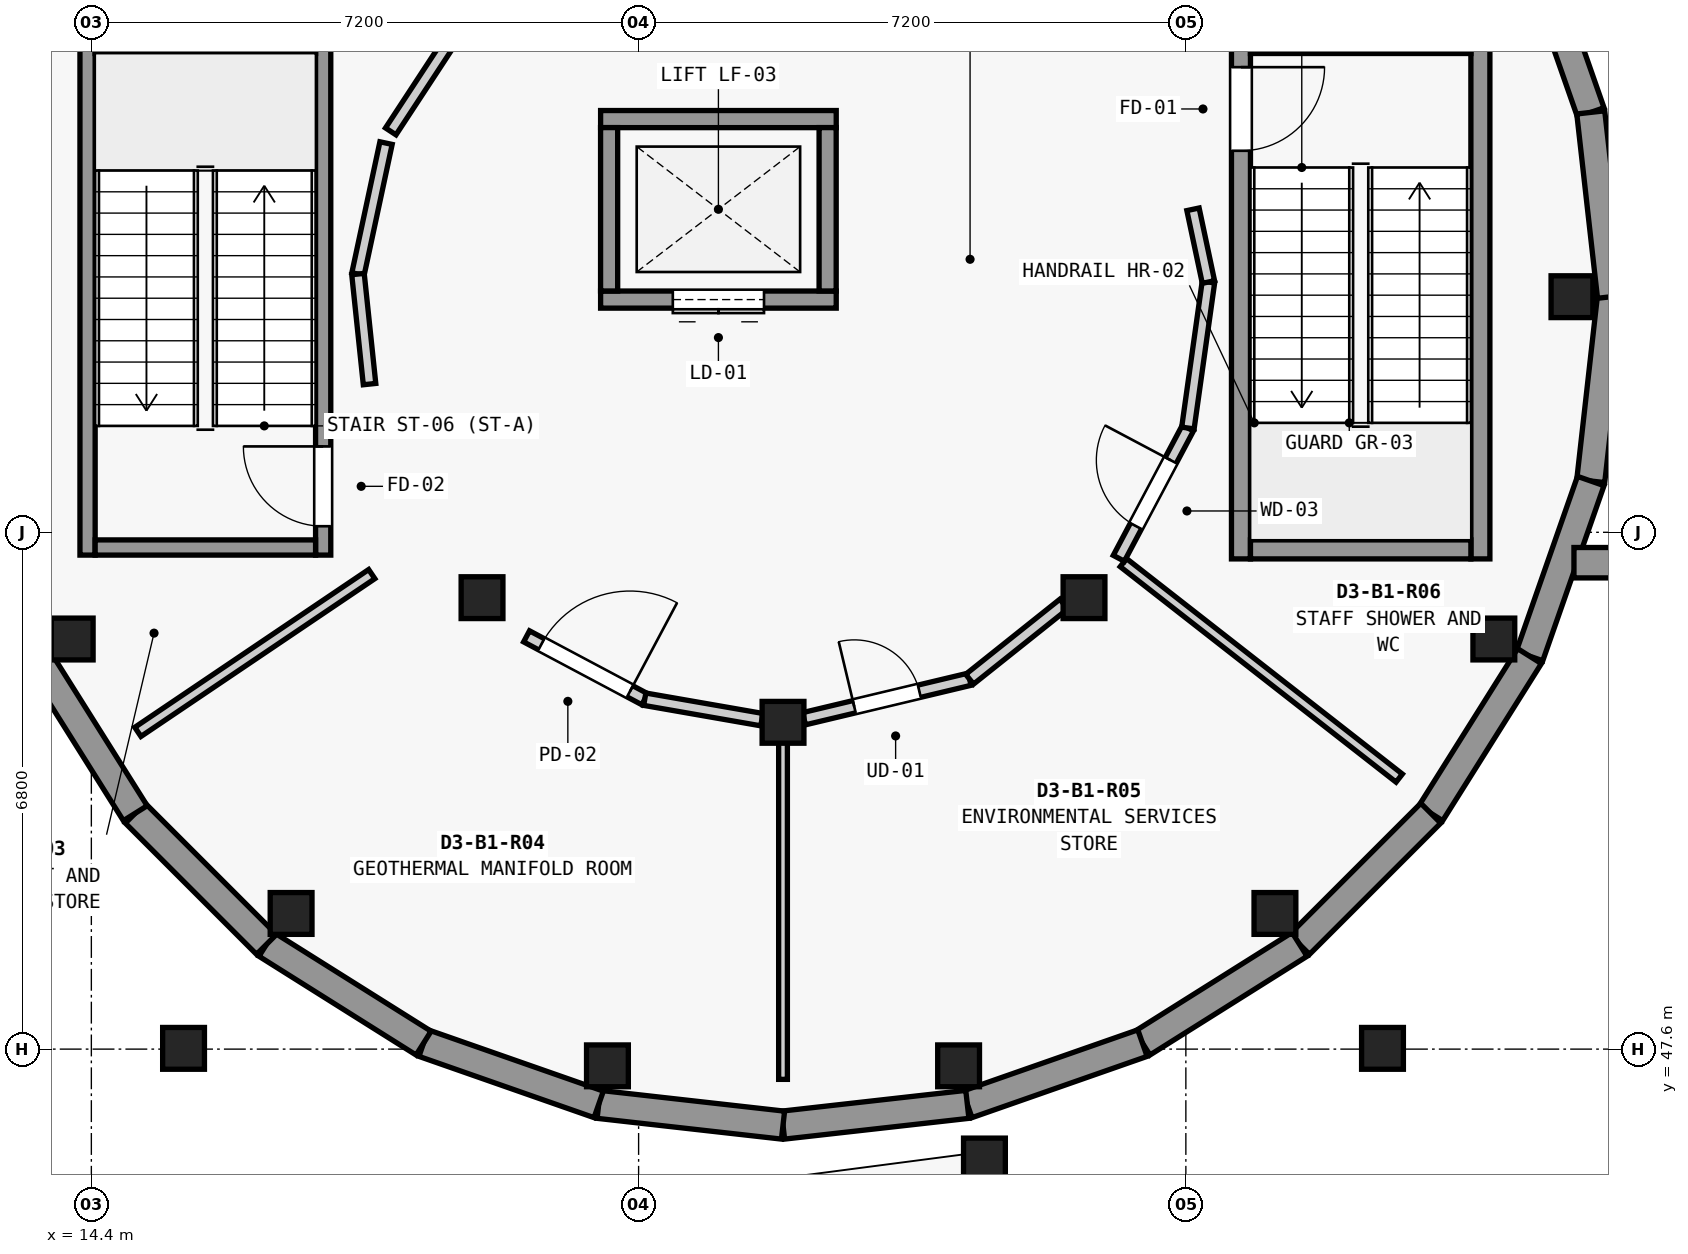
"""IFC4 building model, lengths in metres.
Left out: names, types, materials, properties, quantities, classifications, styles, units other than length and angle.
Written with IfcOpenShell. Run it as: python <this file> out.ifc"""

import sys

from ifc_helpers import new_model, si_unit, direction, frame, frame_2d, origin, origin_2d, place, context, subcontext, project, spatial, rectangle, extrude, element, fill, save


model = new_model("IFC4")
c1 = context("Model", 3, precision=1e-05, world=origin(), true_north=direction((0.0, 1.0)))
c2 = subcontext(c1, "Body", "Model", "MODEL_VIEW")
j1 = project(units=[si_unit("LENGTHUNIT", "METRE"), si_unit("PLANEANGLEUNIT", "RADIAN")], contexts=[c1])
p1 = place(None, origin())
s1 = spatial("IfcSite", under=j1, at=p1, CompositionType="ELEMENT")
p2 = place(p1, origin())
s2 = spatial("IfcBuilding", under=s1, at=p2, CompositionType="ELEMENT")
p3 = place(p2, frame((0.0, 0.0, -4.55)))
s3 = spatial("IfcBuildingStorey", under=s2, at=p3, CompositionType="ELEMENT", Elevation=-4.55)
for number, where, z_axis, x_axis in (
    (1, (33.88, 57.5, 0.0), (0.0, 0.0, 1.0), (1.0, 0.0, 0.0)),
    (2, (14.148, 52.996, 0.0), (0.0, 0.0, 1.0), (1.0, 0.0, 0.0)),
    (3, (17.028, 49.385, 0.0), (0.0, 0.0, 1.0), (1.0, 0.0, 0.0)),
    (4, (21.19, 47.38, 0.0), (0.0, 0.0, 1.0), (1.0, 0.0, 0.0)),
    (5, (25.81, 47.38, 0.0), (0.0, 0.0, 1.0), (1.0, 0.0, 0.0)),
    (6, (29.972, 49.385, 0.0), (0.0, 0.0, 1.0), (1.0, 0.0, 0.0)),
    (7, (32.852, 52.996, 0.0), (0.0, 0.0, 1.0), (1.0, 0.0, 0.0)),
    (8, (19.54, 53.54, 0.0), (0.0, 0.0, 1.0), (1.0, 0.0, 0.0)),
    (9, (23.5, 51.9, 0.0), (0.0, 0.0, 1.0), (1.0, 0.0, 0.0)),
    (10, (27.46, 53.54, 0.0), (0.0, 0.0, 1.0), (1.0, 0.0, 0.0)),
    (11, (26.15, 46.154, 0.0), (0.0, 0.0, 1.0), (1.0, 0.0, 0.0)),
):
    element("IfcColumn", number, at=place(p3, frame(where, z_axis=z_axis, x_axis=x_axis)), inside=s3, PredefinedType="COLUMN", context=c2, shape_type="SweptSolid", body=[
        extrude(rectangle(XDim=0.55, YDim=0.55, at=origin_2d()), origin(), (0.0, 0.0, 1.0), 4.55),
    ])
for number, where, z_axis, x_axis in (
    (12, (15.613, 47.61, 0.0), (0.0, 0.0, 1.0), (1.0, 0.0, 0.0)),
    (13, (31.387, 47.61, 0.0), (0.0, 0.0, 1.0), (1.0, 0.0, 0.0)),
):
    element("IfcColumn", number, at=place(p3, frame(where, z_axis=z_axis, x_axis=x_axis)), inside=s3, PredefinedType="COLUMN", context=c2, shape_type="SweptSolid", body=[
        extrude(rectangle(XDim=0.55, YDim=0.55, at=origin_2d()), origin(), (0.0, 0.0, 1.0), 5.7),
    ])
p4 = place(p3, frame((34.4, 57.5, 0.0), z_axis=(0.0, 0.0, 1.0), x_axis=(-0.111847873866, -0.993725340882, 0.0)))
e14 = element("IfcWall", 14, at=p4, inside=s3, PredefinedType="USERDEFINED", context=c2, shape_type="SweptSolid", body=[
    extrude(rectangle(XDim=2.44, YDim=0.37, at=frame_2d((1.22, 0.0))), origin(), (0.0, 0.0, 1.0), 3.335),
])
p5 = place(p3, frame((34.127, 55.075, 0.0), z_axis=(0.0, 0.0, 1.0), x_axis=(-0.330176659411, -0.943919156274, 0.0)))
e15 = element("IfcWall", 15, at=p5, inside=s3, PredefinedType="USERDEFINED", context=c2, shape_type="SweptSolid", body=[
    extrude(rectangle(XDim=2.441, YDim=0.37, at=frame_2d((1.22, 0.0))), origin(), (0.0, 0.0, 1.0), 3.335),
])
p6 = place(p3, frame((33.321, 52.771, 0.0), z_axis=(0.0, 0.0, 1.0), x_axis=(-0.532136726684, -0.846658434148, 0.0)))
e16 = element("IfcWall", 16, at=p6, inside=s3, PredefinedType="USERDEFINED", context=c2, shape_type="SweptSolid", body=[
    extrude(rectangle(XDim=2.441, YDim=0.37, at=frame_2d((1.221, 0.0))), origin(), (0.0, 0.0, 1.0), 3.335),
])
p7 = place(p3, frame((32.022, 50.704, 0.0), z_axis=(0.0, 0.0, 1.0), x_axis=(-0.707106781187, -0.707106781187, 0.0)))
e17 = element("IfcWall", 17, at=p7, inside=s3, PredefinedType="USERDEFINED", context=c2, shape_type="SweptSolid", body=[
    extrude(rectangle(XDim=2.441, YDim=0.37, at=frame_2d((1.22, 0.0))), origin(), (0.0, 0.0, 1.0), 3.335),
])
p8 = place(p3, frame((30.296, 48.978, 0.0), z_axis=(0.0, 0.0, 1.0), x_axis=(-0.846658434148, -0.532136726684, 0.0)))
e18 = element("IfcWall", 18, at=p8, inside=s3, PredefinedType="USERDEFINED", context=c2, shape_type="SweptSolid", body=[
    extrude(rectangle(XDim=2.441, YDim=0.37, at=frame_2d((1.221, 0.0))), origin(), (0.0, 0.0, 1.0), 3.335),
])
p9 = place(p3, frame((28.229, 47.679, 0.0), z_axis=(0.0, 0.0, 1.0), x_axis=(-0.943919156274, -0.330176659411, 0.0)))
e19 = element("IfcWall", 19, at=p9, inside=s3, PredefinedType="USERDEFINED", context=c2, shape_type="SweptSolid", body=[
    extrude(rectangle(XDim=2.441, YDim=0.37, at=frame_2d((1.22, 0.0))), origin(), (0.0, 0.0, 1.0), 3.335),
])
for number, where, z_axis, x_axis in (
    (20, (25.925, 46.873, 0.0), (0.0, 0.0, 1.0), (-0.994, -0.112, 0.0)),
    (21, (23.5, 46.6, 0.0), (0.0, 0.0, 1.0), (-0.994, 0.112, 0.0)),
):
    element("IfcWall", number, at=place(p3, frame(where, z_axis=z_axis, x_axis=x_axis)), inside=s3, PredefinedType="USERDEFINED", context=c2, shape_type="SweptSolid", body=[
        extrude(rectangle(XDim=2.44, YDim=0.37, at=frame_2d((1.22, 0.0))), origin(), (0.0, 0.0, 1.0), 3.335),
    ])
p10 = place(p3, frame((21.075, 46.873, 0.0), z_axis=(0.0, 0.0, 1.0), x_axis=(-0.943919156274, 0.330176659411, 0.0)))
e22 = element("IfcWall", 22, at=p10, inside=s3, PredefinedType="USERDEFINED", context=c2, shape_type="SweptSolid", body=[
    extrude(rectangle(XDim=2.441, YDim=0.37, at=frame_2d((1.22, 0.0))), origin(), (0.0, 0.0, 1.0), 3.335),
])
p11 = place(p3, frame((18.771, 47.679, 0.0), z_axis=(0.0, 0.0, 1.0), x_axis=(-0.846658434148, 0.532136726684, 0.0)))
e23 = element("IfcWall", 23, at=p11, inside=s3, PredefinedType="USERDEFINED", context=c2, shape_type="SweptSolid", body=[
    extrude(rectangle(XDim=2.441, YDim=0.37, at=frame_2d((1.221, 0.0))), origin(), (0.0, 0.0, 1.0), 3.335),
])
p12 = place(p3, frame((16.704, 48.978, 0.0), z_axis=(0.0, 0.0, 1.0), x_axis=(-0.707106781187, 0.707106781187, 0.0)))
e24 = element("IfcWall", 24, at=p12, inside=s3, PredefinedType="USERDEFINED", context=c2, shape_type="SweptSolid", body=[
    extrude(rectangle(XDim=2.441, YDim=0.37, at=frame_2d((1.22, 0.0))), origin(), (0.0, 0.0, 1.0), 3.335),
])
p13 = place(p3, frame((14.978, 50.704, 0.0), z_axis=(0.0, 0.0, 1.0), x_axis=(-0.532136726684, 0.846658434148, 0.0)))
e25 = element("IfcWall", 25, at=p13, inside=s3, PredefinedType="USERDEFINED", context=c2, shape_type="SweptSolid", body=[
    extrude(rectangle(XDim=2.441, YDim=0.37, at=frame_2d((1.221, 0.0))), origin(), (0.0, 0.0, 1.0), 3.335),
])
p14 = place(p3, frame((33.321, 62.229, 0.0), z_axis=(0.0, 0.0, 1.0), x_axis=(0.330176659411, -0.943919156274, 0.0)))
e26 = element("IfcWall", 26, at=p14, inside=s3, PredefinedType="USERDEFINED", context=c2, shape_type="SweptSolid", body=[
    extrude(rectangle(XDim=2.441, YDim=0.37, at=frame_2d((1.22, 0.0))), origin(), (0.0, 0.0, 1.0), 3.335),
])
p15 = place(p3, frame((34.127, 59.925, 0.0), z_axis=(0.0, 0.0, 1.0), x_axis=(0.111847873866, -0.993725340882, 0.0)))
e27 = element("IfcWall", 27, at=p15, inside=s3, PredefinedType="USERDEFINED", context=c2, shape_type="SweptSolid", body=[
    extrude(rectangle(XDim=2.44, YDim=0.37, at=frame_2d((1.22, 0.0))), origin(), (0.0, 0.0, 1.0), 3.335),
])
p16 = place(p3, frame((33.906, 54.0, 0.0), z_axis=(0.0, 0.0, 1.0), x_axis=(1.0, 0.0, 0.0)))
e28 = element("IfcWall", 28, at=p16, inside=s3, PredefinedType="USERDEFINED", context=c2, shape_type="SweptSolid", body=[
    extrude(rectangle(XDim=5.27, YDim=0.4, at=frame_2d((2.635, 0.0))), origin(), (0.0, 0.0, 1.0), 6.68),
])
p17 = place(p3, frame((29.525, 60.95, 0.0), z_axis=(0.0, 0.0, 1.0), x_axis=(0.0, -1.0, 0.0)))
e29 = element("IfcWall", 29, at=p17, inside=s3, PredefinedType="SHEAR", context=c2, shape_type="SweptSolid", body=[
    extrude(rectangle(XDim=6.9, YDim=0.25, at=frame_2d((3.45, 0.0))), origin(), (0.0, 0.0, 1.0), 4.135),
])
p18 = place(p17, frame((0.43, 0.0, 0.0)))
e30 = element("IfcOpeningElement", 30, at=p18, cuts=e29, PredefinedType="OPENING", context=c2, shape_type="SweptSolid", body=[
    extrude(rectangle(XDim=1.1, YDim=2.15, at=frame_2d((0.55, 1.075))), frame((0.0, 0.135, 0.0), z_axis=(0.0, -1.0, 0.0), x_axis=(1.0, 0.0, 0.0)), (0.0, 0.0, 1.0), 0.27),
])
p19 = place(p3, frame((32.675, 60.95, 0.0), z_axis=(0.0, 0.0, 1.0), x_axis=(0.0, -1.0, 0.0)))
e31 = element("IfcWall", 31, at=p19, inside=s3, PredefinedType="SHEAR", context=c2, shape_type="SweptSolid", body=[
    extrude(rectangle(XDim=6.9, YDim=0.25, at=frame_2d((3.45, 0.0))), origin(), (0.0, 0.0, 1.0), 4.135),
])
for number, where, z_axis, x_axis in (
    (32, (29.65, 60.825, 0.0), (0.0, 0.0, 1.0), (1.0, 0.0, 0.0)),
    (33, (29.65, 54.175, 0.0), (0.0, 0.0, 1.0), (1.0, 0.0, 0.0)),
):
    element("IfcWall", number, at=place(p3, frame(where, z_axis=z_axis, x_axis=x_axis)), inside=s3, PredefinedType="SHEAR", context=c2, shape_type="SweptSolid", body=[
        extrude(rectangle(XDim=2.9, YDim=0.25, at=frame_2d((1.45, 0.0))), origin(), (0.0, 0.0, 1.0), 4.135),
    ])
p20 = place(p3, frame((17.45, 54.1, 0.0), z_axis=(0.0, 0.0, 1.0), x_axis=(0.0, 1.0, 0.0)))
e34 = element("IfcWall", 34, at=p20, inside=s3, PredefinedType="SHEAR", context=c2, shape_type="SweptSolid", body=[
    extrude(rectangle(XDim=6.8, YDim=0.2, at=frame_2d((3.4, 0.0))), origin(), (0.0, 0.0, 1.0), 4.135),
])
p21 = place(p20, frame((0.38, 0.0, 0.0)))
e35 = element("IfcOpeningElement", 35, at=p21, cuts=e34, PredefinedType="OPENING", context=c2, shape_type="SweptSolid", body=[
    extrude(rectangle(XDim=1.05, YDim=2.15, at=frame_2d((0.525, 1.075))), frame((0.0, 0.11, 0.0), z_axis=(0.0, -1.0, 0.0), x_axis=(1.0, 0.0, 0.0)), (0.0, 0.0, 1.0), 0.22),
])
p22 = place(p3, frame((14.35, 54.1, 0.0), z_axis=(0.0, 0.0, 1.0), x_axis=(0.0, 1.0, 0.0)))
e36 = element("IfcWall", 36, at=p22, inside=s3, PredefinedType="SHEAR", context=c2, shape_type="SweptSolid", body=[
    extrude(rectangle(XDim=6.8, YDim=0.2, at=frame_2d((3.4, 0.0))), origin(), (0.0, 0.0, 1.0), 4.135),
])
for number, where, z_axis, x_axis in (
    (37, (17.35, 54.2, 0.0), (0.0, 0.0, 1.0), (-1.0, 0.0, 0.0)),
    (38, (17.35, 60.8, 0.0), (0.0, 0.0, 1.0), (-1.0, 0.0, 0.0)),
):
    element("IfcWall", number, at=place(p3, frame(where, z_axis=z_axis, x_axis=x_axis)), inside=s3, PredefinedType="SHEAR", context=c2, shape_type="SweptSolid", body=[
        extrude(rectangle(XDim=2.9, YDim=0.2, at=frame_2d((1.45, 0.0))), origin(), (0.0, 0.0, 1.0), 4.135),
    ])
p23 = place(p3, frame((21.1, 57.462, 0.0), z_axis=(0.0, 0.0, 1.0), x_axis=(1.0, 0.0, 0.0)))
e39 = element("IfcWall", 39, at=p23, inside=s3, PredefinedType="SHEAR", context=c2, shape_type="SweptSolid", body=[
    extrude(rectangle(XDim=3.1, YDim=0.225, at=frame_2d((1.55, 0.0))), origin(), (0.0, 0.0, 1.0), 4.135),
])
p24 = place(p23, frame((0.95, 0.0, 0.0)))
e40 = element("IfcOpeningElement", 40, at=p24, cuts=e39, PredefinedType="OPENING", context=c2, shape_type="SweptSolid", body=[
    extrude(rectangle(XDim=1.2, YDim=2.2, at=frame_2d((0.6, 1.1))), frame((0.0, 0.123, 0.0), z_axis=(0.0, -1.0, 0.0), x_axis=(1.0, 0.0, 0.0)), (0.0, 0.0, 1.0), 0.245),
])
p25 = place(p3, frame((21.1, 59.837, 0.0), z_axis=(0.0, 0.0, 1.0), x_axis=(1.0, 0.0, 0.0)))
e41 = element("IfcWall", 41, at=p25, inside=s3, PredefinedType="SHEAR", context=c2, shape_type="SweptSolid", body=[
    extrude(rectangle(XDim=3.1, YDim=0.225, at=frame_2d((1.55, 0.0))), origin(), (0.0, 0.0, 1.0), 4.135),
])
for number, where, z_axis, x_axis in (
    (42, (21.212, 57.575, 0.0), (0.0, 0.0, 1.0), (0.0, 1.0, 0.0)),
    (43, (24.087, 57.575, 0.0), (0.0, 0.0, 1.0), (0.0, 1.0, 0.0)),
):
    element("IfcWall", number, at=place(p3, frame(where, z_axis=z_axis, x_axis=x_axis)), inside=s3, PredefinedType="SHEAR", context=c2, shape_type="SweptSolid", body=[
        extrude(rectangle(XDim=2.15, YDim=0.225, at=frame_2d((1.075, 0.0))), origin(), (0.0, 0.0, 1.0), 4.135),
    ])
p26 = place(p3, frame((18.089, 53.85, 0.0), z_axis=(0.0, 0.0, 1.0), x_axis=(-0.828961502122, -0.559305665982, 0.0)))
e44 = element("IfcWall", 44, at=p26, inside=s3, PredefinedType="PARTITIONING", context=c2, shape_type="SweptSolid", body=[
    extrude(rectangle(XDim=3.712, YDim=0.145, at=frame_2d((1.856, 0.0))), origin(), (0.0, 0.0, 1.0), 3.31),
])
p27 = place(p3, frame((23.5, 51.817, 0.0), z_axis=(0.0, 0.0, 1.0), x_axis=(0.0, -1.0, 0.0)))
e45 = element("IfcWall", 45, at=p27, inside=s3, PredefinedType="PARTITIONING", context=c2, shape_type="SweptSolid", body=[
    extrude(rectangle(XDim=4.615, YDim=0.115, at=frame_2d((2.308, 0.0))), origin(), (0.0, 0.0, 1.0), 3.31),
])
p28 = place(p3, frame((27.978, 54.001, 0.0), z_axis=(0.0, 0.0, 1.0), x_axis=(0.788037233831, -0.615627580681, 0.0)))
e46 = element("IfcWall", 46, at=p28, inside=s3, PredefinedType="PLUMBINGWALL", context=c2, shape_type="SweptSolid", body=[
    extrude(rectangle(XDim=4.605, YDim=0.135, at=frame_2d((2.302, 0.0))), origin(), (0.0, 0.0, 1.0), 3.31),
])
p29 = place(p3, frame((19.366, 61.241, 0.0), z_axis=(0.0, 0.0, 1.0), x_axis=(-0.548365930053, -0.836238486771, 0.0)))
e47 = element("IfcWall", 47, at=p29, inside=s3, PredefinedType="PARTITIONING", context=c2, shape_type="SweptSolid", body=[
    extrude(rectangle(XDim=1.873, YDim=0.165, at=frame_2d((0.936, 0.0))), origin(), (0.0, 0.0, 1.0), 3.31),
])
p30 = place(p3, frame((18.277, 59.521, 0.0), z_axis=(0.0, 0.0, 1.0), x_axis=(-0.209500701014, -0.977808496729, 0.0)))
e48 = element("IfcWall", 48, at=p30, inside=s3, PredefinedType="PARTITIONING", context=c2, shape_type="SweptSolid", body=[
    extrude(rectangle(XDim=1.762, YDim=0.165, at=frame_2d((0.881, 0.0))), origin(), (0.0, 0.0, 1.0), 3.31),
])
p31 = place(p3, frame((17.908, 57.798, 0.0), z_axis=(0.0, 0.0, 1.0), x_axis=(0.10446656428, -0.994528399267, 0.0)))
e49 = element("IfcWall", 49, at=p31, inside=s3, PredefinedType="PARTITIONING", context=c2, shape_type="SweptSolid", body=[
    extrude(rectangle(XDim=1.456, YDim=0.165, at=frame_2d((0.728, 0.0))), origin(), (0.0, 0.0, 1.0), 3.31),
])
p32 = place(p3, frame((20.126, 53.031, 0.0), z_axis=(0.0, 0.0, 1.0), x_axis=(0.882916409472, -0.469530205508, 0.0)))
e50 = element("IfcWall", 50, at=p32, inside=s3, PredefinedType="PARTITIONING", context=c2, shape_type="SweptSolid", body=[
    extrude(rectangle(XDim=1.761, YDim=0.165, at=frame_2d((0.881, 0.0))), origin(), (0.0, 0.0, 1.0), 3.31),
])
p33 = place(p32, frame((0.221, 0.0, 0.0)))
e51 = element("IfcOpeningElement", 51, at=p33, cuts=e50, PredefinedType="OPENING", context=c2, shape_type="SweptSolid", body=[
    extrude(rectangle(XDim=1.32, YDim=2.24, at=frame_2d((0.66, 1.12))), frame((0.0, 0.093, 0.0), z_axis=(0.0, -1.0, 0.0), x_axis=(1.0, 0.0, 0.0)), (0.0, 0.0, 1.0), 0.185),
])
p34 = place(p3, frame((21.681, 52.204, 0.0), z_axis=(0.0, 0.0, 1.0), x_axis=(0.985099289187, -0.171986599601, 0.0)))
e52 = element("IfcWall", 52, at=p34, inside=s3, PredefinedType="PARTITIONING", context=c2, shape_type="SweptSolid", body=[
    extrude(rectangle(XDim=1.564, YDim=0.165, at=frame_2d((0.782, 0.0))), origin(), (0.0, 0.0, 1.0), 3.31),
])
p35 = place(p3, frame((23.776, 51.947, 0.0), z_axis=(0.0, 0.0, 1.0), x_axis=(0.972689167377, 0.232111575903, 0.0)))
e53 = element("IfcWall", 53, at=p35, inside=s3, PredefinedType="PARTITIONING", context=c2, shape_type="SweptSolid", body=[
    extrude(rectangle(XDim=2.24, YDim=0.165, at=frame_2d((1.12, 0.0))), origin(), (0.0, 0.0, 1.0), 3.31),
])
p36 = place(p35, frame((0.68, 0.0, 0.0)))
e54 = element("IfcOpeningElement", 54, at=p36, cuts=e53, PredefinedType="OPENING", context=c2, shape_type="SweptSolid", body=[
    extrude(rectangle(XDim=0.88, YDim=2.1, at=frame_2d((0.44, 1.05))), frame((0.0, 0.093, 0.0), z_axis=(0.0, -1.0, 0.0), x_axis=(1.0, 0.0, 0.0)), (0.0, 0.0, 1.0), 0.185),
])
p37 = place(p3, frame((25.955, 52.467, 0.0), z_axis=(0.0, 0.0, 1.0), x_axis=(0.781844808281, 0.623473091451, 0.0)))
e55 = element("IfcWall", 55, at=p37, inside=s3, PredefinedType="PARTITIONING", context=c2, shape_type="SweptSolid", body=[
    extrude(rectangle(XDim=1.585, YDim=0.165, at=frame_2d((0.792, 0.0))), origin(), (0.0, 0.0, 1.0), 3.31),
])
p38 = place(p3, frame((27.918, 54.058, 0.0), z_axis=(0.0, 0.0, 1.0), x_axis=(0.46852941816, 0.883447895644, 0.0)))
e56 = element("IfcWall", 56, at=p38, inside=s3, PredefinedType="PARTITIONING", context=c2, shape_type="SweptSolid", body=[
    extrude(rectangle(XDim=1.94, YDim=0.165, at=frame_2d((0.97, 0.0))), origin(), (0.0, 0.0, 1.0), 3.31),
])
p39 = place(p38, frame((0.48, 0.0, 0.0)))
e57 = element("IfcOpeningElement", 57, at=p39, cuts=e56, PredefinedType="OPENING", context=c2, shape_type="SweptSolid", body=[
    extrude(rectangle(XDim=0.98, YDim=2.1, at=frame_2d((0.49, 1.05))), frame((0.0, 0.093, 0.0), z_axis=(0.0, -1.0, 0.0), x_axis=(1.0, 0.0, 0.0)), (0.0, 0.0, 1.0), 0.185),
])
p40 = place(p3, frame((28.827, 55.772, 0.0), z_axis=(0.0, 0.0, 1.0), x_axis=(0.139183488293, 0.990266608842, 0.0)))
e58 = element("IfcWall", 58, at=p40, inside=s3, PredefinedType="PARTITIONING", context=c2, shape_type="SweptSolid", body=[
    extrude(rectangle(XDim=1.94, YDim=0.165, at=frame_2d((0.97, 0.0))), origin(), (0.0, 0.0, 1.0), 3.31),
])
p41 = place(p3, frame((29.097, 57.693, 0.0), z_axis=(0.0, 0.0, 1.0), x_axis=(-0.20743182321, 0.978249476729, 0.0)))
e59 = element("IfcWall", 59, at=p41, inside=s3, PredefinedType="PARTITIONING", context=c2, shape_type="SweptSolid", body=[
    extrude(rectangle(XDim=0.978, YDim=0.165, at=frame_2d((0.489, 0.0))), origin(), (0.0, 0.0, 1.0), 3.31),
])
p42 = place(p18, origin())
e60 = element("IfcDoor", 60, at=p42, inside=s3, OperationType="SINGLE_SWING_LEFT", PredefinedType="DOOR", context=c2, shape_type="SweptSolid", body=[
    extrude(rectangle(XDim=1.1, YDim=2.15, at=frame_2d((0.55, 1.075))), frame((0.0, 0.025, 0.0), z_axis=(0.0, -1.0, 0.0), x_axis=(1.0, 0.0, 0.0)), (0.0, 0.0, 1.0), 0.05),
])
fill(e30, e60)
p43 = place(p21, origin())
e61 = element("IfcDoor", 61, at=p43, inside=s3, OperationType="SINGLE_SWING_RIGHT", PredefinedType="DOOR", context=c2, shape_type="SweptSolid", body=[
    extrude(rectangle(XDim=1.05, YDim=2.15, at=frame_2d((0.525, 1.075))), frame((0.0, 0.025, 0.0), z_axis=(0.0, -1.0, 0.0), x_axis=(1.0, 0.0, 0.0)), (0.0, 0.0, 1.0), 0.05),
])
fill(e35, e61)
p44 = place(p24, origin())
e62 = element("IfcDoor", 62, at=p44, inside=s3, OperationType="DOUBLE_DOOR_SLIDING", PredefinedType="DOOR", context=c2, shape_type="SweptSolid", body=[
    extrude(rectangle(XDim=1.2, YDim=2.2, at=frame_2d((0.6, 1.1))), frame((0.0, 0.025, 0.0), z_axis=(0.0, -1.0, 0.0), x_axis=(1.0, 0.0, 0.0)), (0.0, 0.0, 1.0), 0.05),
])
fill(e40, e62)
p45 = place(p33, origin())
e63 = element("IfcDoor", 63, at=p45, inside=s3, OperationType="SINGLE_SWING_RIGHT", PredefinedType="DOOR", context=c2, shape_type="SweptSolid", body=[
    extrude(rectangle(XDim=1.32, YDim=2.24, at=frame_2d((0.66, 1.12))), frame((0.0, 0.025, 0.0), z_axis=(0.0, -1.0, 0.0), x_axis=(1.0, 0.0, 0.0)), (0.0, 0.0, 1.0), 0.05),
])
fill(e51, e63)
p46 = place(p36, origin())
e64 = element("IfcDoor", 64, at=p46, inside=s3, OperationType="SINGLE_SWING_LEFT", PredefinedType="DOOR", context=c2, shape_type="SweptSolid", body=[
    extrude(rectangle(XDim=0.88, YDim=2.1, at=frame_2d((0.44, 1.05))), frame((0.0, 0.025, 0.0), z_axis=(0.0, -1.0, 0.0), x_axis=(1.0, 0.0, 0.0)), (0.0, 0.0, 1.0), 0.05),
])
fill(e54, e64)
p47 = place(p39, origin())
e65 = element("IfcDoor", 65, at=p47, inside=s3, OperationType="SINGLE_SWING_RIGHT", PredefinedType="DOOR", context=c2, shape_type="SweptSolid", body=[
    extrude(rectangle(XDim=0.98, YDim=2.1, at=frame_2d((0.49, 1.05))), frame((0.0, 0.025, 0.0), z_axis=(0.0, -1.0, 0.0), x_axis=(1.0, 0.0, 0.0)), (0.0, 0.0, 1.0), 0.05),
])
fill(e57, e65)
save(model, sys.argv[1])
